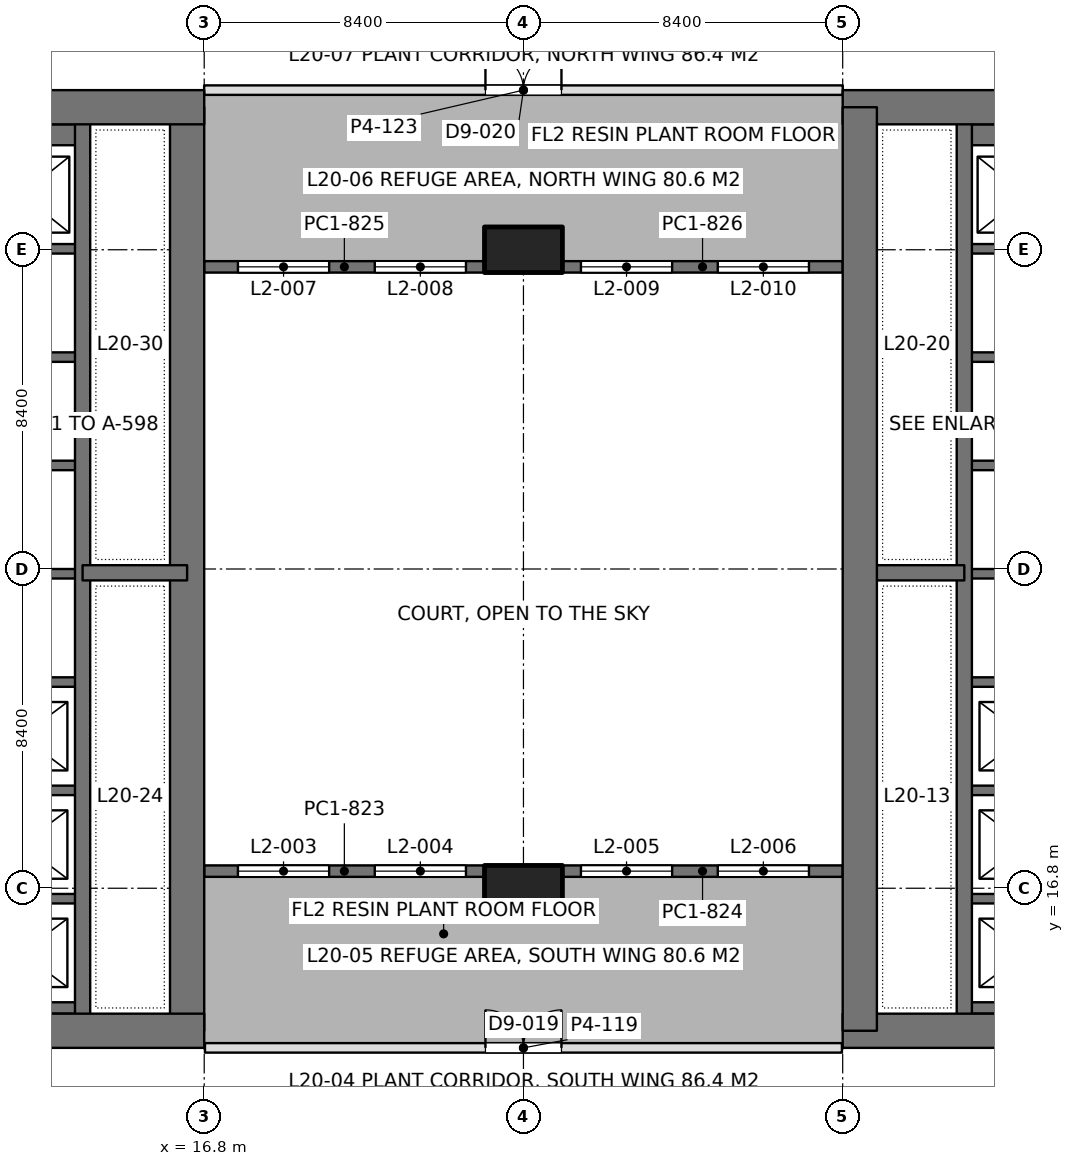
"""IFC4 building model, lengths in metres.
Left out: names, types, materials, properties, quantities, classifications, styles, units other than length and angle.
Written with IfcOpenShell. Run it as: python <this file> out.ifc"""

import sys

from ifc_helpers import new_model, si_unit, direction, frame, frame_2d, origin, origin_2d, place, context, subcontext, project, spatial, rectangle, extrude, element, fill, save


model = new_model("IFC4")
c1 = context("Model", 3, precision=1e-05, world=origin(), true_north=direction((0.0, 1.0)))
c2 = subcontext(c1, "Body", "Model", "MODEL_VIEW")
j1 = project(units=[si_unit("LENGTHUNIT", "METRE"), si_unit("PLANEANGLEUNIT", "RADIAN")], contexts=[c1])
p1 = place(None, origin())
s1 = spatial("IfcSite", under=j1, at=p1, CompositionType="ELEMENT")
p2 = place(p1, origin())
s2 = spatial("IfcBuilding", under=s1, at=p2, CompositionType="ELEMENT")
p3 = place(p2, frame((0.0, 0.0, 90.9)))
s3 = spatial("IfcBuildingStorey", under=s2, at=p3, CompositionType="ELEMENT", Elevation=90.9)
for number, where, z_axis, x_axis in (
    (1, (25.2, 16.8, 0.0), (0.0, 0.0, 1.0), (1.0, 0.0, 0.0)),
    (2, (25.2, 33.6, 0.0), (0.0, 0.0, 1.0), (1.0, 0.0, 0.0)),
):
    element("IfcColumn", number, at=place(p3, frame(where, z_axis=z_axis, x_axis=x_axis)), inside=s3, PredefinedType="COLUMN", context=c2, shape_type="SweptSolid", body=[
        extrude(rectangle(XDim=2.05, YDim=1.2, at=origin_2d()), origin(), (0.0, 0.0, 1.0), 5.4),
    ])
p4 = place(p3, frame((-1.2, 13.05, 0.0), z_axis=(0.0, 0.0, 1.0), x_axis=(1.0, 0.0, 0.0)))
e3 = element("IfcWall", 3, at=p4, inside=s3, PredefinedType="SHEAR", context=c2, shape_type="SweptSolid", body=[
    extrude(rectangle(XDim=18.0, YDim=0.9, at=frame_2d((9.0, 0.0))), origin(), (0.0, 0.0, 1.0), 5.4),
])
p5 = place(p4, frame((8.95, 0.0, 0.0)))
e4 = element("IfcOpeningElement", 4, at=p5, cuts=e3, PredefinedType="OPENING", context=c2, shape_type="SweptSolid", body=[
    extrude(rectangle(XDim=1.8, YDim=2.4, at=frame_2d((0.9, 1.2))), frame((0.0, 0.46, 0.0), z_axis=(0.0, -1.0, 0.0), x_axis=(1.0, 0.0, 0.0)), (0.0, 0.0, 1.0), 0.92),
])
p6 = place(p3, frame((-1.2, 37.35, 0.0), z_axis=(0.0, 0.0, 1.0), x_axis=(1.0, 0.0, 0.0)))
e5 = element("IfcWall", 5, at=p6, inside=s3, PredefinedType="SHEAR", context=c2, shape_type="SweptSolid", body=[
    extrude(rectangle(XDim=18.0, YDim=0.9, at=frame_2d((9.0, 0.0))), origin(), (0.0, 0.0, 1.0), 5.4),
])
p7 = place(p6, frame((8.95, 0.0, 0.0)))
e6 = element("IfcOpeningElement", 6, at=p7, cuts=e5, PredefinedType="OPENING", context=c2, shape_type="SweptSolid", body=[
    extrude(rectangle(XDim=1.8, YDim=2.4, at=frame_2d((0.9, 1.2))), frame((0.0, 0.46, 0.0), z_axis=(0.0, -1.0, 0.0), x_axis=(1.0, 0.0, 0.0)), (0.0, 0.0, 1.0), 0.92),
])
p8 = place(p3, frame((16.35, 13.05, 0.0), z_axis=(0.0, 0.0, 1.0), x_axis=(0.0, 1.0, 0.0)))
e7 = element("IfcWall", 7, at=p8, inside=s3, PredefinedType="SHEAR", context=c2, shape_type="SweptSolid", body=[
    extrude(rectangle(XDim=24.3, YDim=0.9, at=frame_2d((12.15, 0.0))), origin(), (0.0, 0.0, 1.0), 5.4),
])
p9 = place(p3, frame((13.6, 13.05, 0.0), z_axis=(0.0, 0.0, 1.0), x_axis=(0.0, 1.0, 0.0)))
e8 = element("IfcWall", 8, at=p9, inside=s3, PredefinedType="SHEAR", context=c2, shape_type="SweptSolid", body=[
    extrude(rectangle(XDim=24.3, YDim=0.4, at=frame_2d((12.15, 0.0))), origin(), (0.0, 0.0, 1.0), 5.4),
])
p10 = place(p3, frame((13.6, 25.1, 0.0), z_axis=(0.0, 0.0, 1.0), x_axis=(1.0, 0.0, 0.0)))
e9 = element("IfcWall", 9, at=p10, inside=s3, PredefinedType="SHEAR", context=c2, shape_type="SweptSolid", body=[
    extrude(rectangle(XDim=2.75, YDim=0.4, at=frame_2d((1.375, 0.0))), origin(), (0.0, 0.0, 1.0), 5.4),
])
p11 = place(p3, frame((10.4, 13.65, 0.0), z_axis=(0.0, 0.0, 1.0), x_axis=(1.0, 0.0, 0.0)))
e10 = element("IfcWall", 10, at=p11, inside=s3, PredefinedType="SHEAR", context=c2, shape_type="SweptSolid", body=[
    extrude(rectangle(XDim=3.2, YDim=0.3, at=frame_2d((1.6, 0.0))), origin(), (0.0, 0.0, 1.0), 5.4),
])
for number, where, z_axis, x_axis in (
    (11, (10.4, 16.525, 0.0), (0.0, 0.0, 1.0), (1.0, 0.0, 0.0)),
    (12, (10.4, 19.375, 0.0), (0.0, 0.0, 1.0), (1.0, 0.0, 0.0)),
    (13, (10.4, 22.225, 0.0), (0.0, 0.0, 1.0), (1.0, 0.0, 0.0)),
    (14, (10.4, 25.075, 0.0), (0.0, 0.0, 1.0), (1.0, 0.0, 0.0)),
    (15, (10.4, 27.925, 0.0), (0.0, 0.0, 1.0), (1.0, 0.0, 0.0)),
    (16, (10.4, 30.775, 0.0), (0.0, 0.0, 1.0), (1.0, 0.0, 0.0)),
    (17, (10.4, 33.625, 0.0), (0.0, 0.0, 1.0), (1.0, 0.0, 0.0)),
):
    element("IfcWall", number, at=place(p3, frame(where, z_axis=z_axis, x_axis=x_axis)), inside=s3, PredefinedType="SHEAR", context=c2, shape_type="SweptSolid", body=[
        extrude(rectangle(XDim=3.2, YDim=0.25, at=frame_2d((1.6, 0.0))), origin(), (0.0, 0.0, 1.0), 5.4),
    ])
p12 = place(p3, frame((10.4, 36.625, 0.0), z_axis=(0.0, 0.0, 1.0), x_axis=(1.0, 0.0, 0.0)))
e18 = element("IfcWall", 18, at=p12, inside=s3, PredefinedType="SHEAR", context=c2, shape_type="SweptSolid", body=[
    extrude(rectangle(XDim=3.2, YDim=0.55, at=frame_2d((1.6, 0.0))), origin(), (0.0, 0.0, 1.0), 5.4),
])
p13 = place(p3, frame((33.6, 13.05, 0.0), z_axis=(0.0, 0.0, 1.0), x_axis=(1.0, 0.0, 0.0)))
e19 = element("IfcWall", 19, at=p13, inside=s3, PredefinedType="SHEAR", context=c2, shape_type="SweptSolid", body=[
    extrude(rectangle(XDim=18.0, YDim=0.9, at=frame_2d((9.0, 0.0))), origin(), (0.0, 0.0, 1.0), 5.4),
])
p14 = place(p13, frame((7.25, 0.0, 0.0)))
e20 = element("IfcOpeningElement", 20, at=p14, cuts=e19, PredefinedType="OPENING", context=c2, shape_type="SweptSolid", body=[
    extrude(rectangle(XDim=1.8, YDim=2.4, at=frame_2d((0.9, 1.2))), frame((0.0, 0.46, 0.0), z_axis=(0.0, -1.0, 0.0), x_axis=(1.0, 0.0, 0.0)), (0.0, 0.0, 1.0), 0.92),
])
p15 = place(p3, frame((33.6, 37.35, 0.0), z_axis=(0.0, 0.0, 1.0), x_axis=(1.0, 0.0, 0.0)))
e21 = element("IfcWall", 21, at=p15, inside=s3, PredefinedType="SHEAR", context=c2, shape_type="SweptSolid", body=[
    extrude(rectangle(XDim=18.0, YDim=0.9, at=frame_2d((9.0, 0.0))), origin(), (0.0, 0.0, 1.0), 5.4),
])
p16 = place(p15, frame((7.25, 0.0, 0.0)))
e22 = element("IfcOpeningElement", 22, at=p16, cuts=e21, PredefinedType="OPENING", context=c2, shape_type="SweptSolid", body=[
    extrude(rectangle(XDim=1.8, YDim=2.4, at=frame_2d((0.9, 1.2))), frame((0.0, 0.46, 0.0), z_axis=(0.0, -1.0, 0.0), x_axis=(1.0, 0.0, 0.0)), (0.0, 0.0, 1.0), 0.92),
])
p17 = place(p3, frame((34.05, 13.05, 0.0), z_axis=(0.0, 0.0, 1.0), x_axis=(0.0, 1.0, 0.0)))
e23 = element("IfcWall", 23, at=p17, inside=s3, PredefinedType="SHEAR", context=c2, shape_type="SweptSolid", body=[
    extrude(rectangle(XDim=24.3, YDim=0.9, at=frame_2d((12.15, 0.0))), origin(), (0.0, 0.0, 1.0), 5.4),
])
p18 = place(p3, frame((36.8, 13.05, 0.0), z_axis=(0.0, 0.0, 1.0), x_axis=(0.0, 1.0, 0.0)))
e24 = element("IfcWall", 24, at=p18, inside=s3, PredefinedType="SHEAR", context=c2, shape_type="SweptSolid", body=[
    extrude(rectangle(XDim=24.3, YDim=0.4, at=frame_2d((12.15, 0.0))), origin(), (0.0, 0.0, 1.0), 5.4),
])
p19 = place(p3, frame((36.8, 25.1, 0.0), z_axis=(0.0, 0.0, 1.0), x_axis=(-1.0, 0.0, 0.0)))
e25 = element("IfcWall", 25, at=p19, inside=s3, PredefinedType="SHEAR", context=c2, shape_type="SweptSolid", body=[
    extrude(rectangle(XDim=2.75, YDim=0.4, at=frame_2d((1.375, 0.0))), origin(), (0.0, 0.0, 1.0), 5.4),
])
p20 = place(p3, frame((40.0, 13.65, 0.0), z_axis=(0.0, 0.0, 1.0), x_axis=(-1.0, 0.0, 0.0)))
e26 = element("IfcWall", 26, at=p20, inside=s3, PredefinedType="SHEAR", context=c2, shape_type="SweptSolid", body=[
    extrude(rectangle(XDim=3.2, YDim=0.3, at=frame_2d((1.6, 0.0))), origin(), (0.0, 0.0, 1.0), 5.4),
])
for number, where, z_axis, x_axis in (
    (27, (40.0, 16.525, 0.0), (0.0, 0.0, 1.0), (-1.0, 0.0, 0.0)),
    (28, (40.0, 19.375, 0.0), (0.0, 0.0, 1.0), (-1.0, 0.0, 0.0)),
    (29, (40.0, 22.225, 0.0), (0.0, 0.0, 1.0), (-1.0, 0.0, 0.0)),
    (30, (40.0, 25.075, 0.0), (0.0, 0.0, 1.0), (-1.0, 0.0, 0.0)),
    (31, (40.0, 27.925, 0.0), (0.0, 0.0, 1.0), (-1.0, 0.0, 0.0)),
    (32, (40.0, 30.775, 0.0), (0.0, 0.0, 1.0), (-1.0, 0.0, 0.0)),
    (33, (40.0, 33.625, 0.0), (0.0, 0.0, 1.0), (-1.0, 0.0, 0.0)),
):
    element("IfcWall", number, at=place(p3, frame(where, z_axis=z_axis, x_axis=x_axis)), inside=s3, PredefinedType="SHEAR", context=c2, shape_type="SweptSolid", body=[
        extrude(rectangle(XDim=3.2, YDim=0.25, at=frame_2d((1.6, 0.0))), origin(), (0.0, 0.0, 1.0), 5.4),
    ])
p21 = place(p3, frame((40.0, 36.625, 0.0), z_axis=(0.0, 0.0, 1.0), x_axis=(-1.0, 0.0, 0.0)))
e34 = element("IfcWall", 34, at=p21, inside=s3, PredefinedType="SHEAR", context=c2, shape_type="SweptSolid", body=[
    extrude(rectangle(XDim=3.2, YDim=0.55, at=frame_2d((1.6, 0.0))), origin(), (0.0, 0.0, 1.0), 5.4),
])
p22 = place(p3, frame((16.8, 17.25, 0.0), z_axis=(0.0, 0.0, 1.0), x_axis=(1.0, 0.0, 0.0)))
e35 = element("IfcWall", 35, at=p22, inside=s3, PredefinedType="SOLIDWALL", context=c2, shape_type="SweptSolid", body=[
    extrude(rectangle(XDim=7.375, YDim=0.3, at=frame_2d((3.688, 0.0))), origin(), (0.0, 0.0, 1.0), 5.24),
])
p23 = place(p22, frame((0.887, 0.0, 1.2)))
e36 = element("IfcOpeningElement", 36, at=p23, cuts=e35, PredefinedType="OPENING", context=c2, shape_type="SweptSolid", body=[
    extrude(rectangle(XDim=2.4, YDim=2.4, at=frame_2d((1.2, 1.2))), frame((0.0, 0.16, 0.0), z_axis=(0.0, -1.0, 0.0), x_axis=(1.0, 0.0, 0.0)), (0.0, 0.0, 1.0), 0.32),
])
p24 = place(p22, frame((4.488, 0.0, 1.2)))
e37 = element("IfcOpeningElement", 37, at=p24, cuts=e35, PredefinedType="OPENING", context=c2, shape_type="SweptSolid", body=[
    extrude(rectangle(XDim=2.4, YDim=2.4, at=frame_2d((1.2, 1.2))), frame((0.0, 0.16, 0.0), z_axis=(0.0, -1.0, 0.0), x_axis=(1.0, 0.0, 0.0)), (0.0, 0.0, 1.0), 0.32),
])
p25 = place(p3, frame((26.225, 17.25, 0.0), z_axis=(0.0, 0.0, 1.0), x_axis=(1.0, 0.0, 0.0)))
e38 = element("IfcWall", 38, at=p25, inside=s3, PredefinedType="SOLIDWALL", context=c2, shape_type="SweptSolid", body=[
    extrude(rectangle(XDim=7.375, YDim=0.3, at=frame_2d((3.688, 0.0))), origin(), (0.0, 0.0, 1.0), 5.24),
])
p26 = place(p25, frame((0.488, 0.0, 1.2)))
e39 = element("IfcOpeningElement", 39, at=p26, cuts=e38, PredefinedType="OPENING", context=c2, shape_type="SweptSolid", body=[
    extrude(rectangle(XDim=2.4, YDim=2.4, at=frame_2d((1.2, 1.2))), frame((0.0, 0.16, 0.0), z_axis=(0.0, -1.0, 0.0), x_axis=(1.0, 0.0, 0.0)), (0.0, 0.0, 1.0), 0.32),
])
p27 = place(p25, frame((4.087, 0.0, 1.2)))
e40 = element("IfcOpeningElement", 40, at=p27, cuts=e38, PredefinedType="OPENING", context=c2, shape_type="SweptSolid", body=[
    extrude(rectangle(XDim=2.4, YDim=2.4, at=frame_2d((1.2, 1.2))), frame((0.0, 0.16, 0.0), z_axis=(0.0, -1.0, 0.0), x_axis=(1.0, 0.0, 0.0)), (0.0, 0.0, 1.0), 0.32),
])
p28 = place(p3, frame((16.8, 33.15, 0.0), z_axis=(0.0, 0.0, 1.0), x_axis=(1.0, 0.0, 0.0)))
e41 = element("IfcWall", 41, at=p28, inside=s3, PredefinedType="SOLIDWALL", context=c2, shape_type="SweptSolid", body=[
    extrude(rectangle(XDim=7.375, YDim=0.3, at=frame_2d((3.688, 0.0))), origin(), (0.0, 0.0, 1.0), 5.24),
])
p29 = place(p28, frame((0.887, 0.0, 1.2)))
e42 = element("IfcOpeningElement", 42, at=p29, cuts=e41, PredefinedType="OPENING", context=c2, shape_type="SweptSolid", body=[
    extrude(rectangle(XDim=2.4, YDim=2.4, at=frame_2d((1.2, 1.2))), frame((0.0, 0.16, 0.0), z_axis=(0.0, -1.0, 0.0), x_axis=(1.0, 0.0, 0.0)), (0.0, 0.0, 1.0), 0.32),
])
p30 = place(p28, frame((4.488, 0.0, 1.2)))
e43 = element("IfcOpeningElement", 43, at=p30, cuts=e41, PredefinedType="OPENING", context=c2, shape_type="SweptSolid", body=[
    extrude(rectangle(XDim=2.4, YDim=2.4, at=frame_2d((1.2, 1.2))), frame((0.0, 0.16, 0.0), z_axis=(0.0, -1.0, 0.0), x_axis=(1.0, 0.0, 0.0)), (0.0, 0.0, 1.0), 0.32),
])
p31 = place(p3, frame((26.225, 33.15, 0.0), z_axis=(0.0, 0.0, 1.0), x_axis=(1.0, 0.0, 0.0)))
e44 = element("IfcWall", 44, at=p31, inside=s3, PredefinedType="SOLIDWALL", context=c2, shape_type="SweptSolid", body=[
    extrude(rectangle(XDim=7.375, YDim=0.3, at=frame_2d((3.688, 0.0))), origin(), (0.0, 0.0, 1.0), 5.24),
])
p32 = place(p31, frame((0.488, 0.0, 1.2)))
e45 = element("IfcOpeningElement", 45, at=p32, cuts=e44, PredefinedType="OPENING", context=c2, shape_type="SweptSolid", body=[
    extrude(rectangle(XDim=2.4, YDim=2.4, at=frame_2d((1.2, 1.2))), frame((0.0, 0.16, 0.0), z_axis=(0.0, -1.0, 0.0), x_axis=(1.0, 0.0, 0.0)), (0.0, 0.0, 1.0), 0.32),
])
p33 = place(p31, frame((4.087, 0.0, 1.2)))
e46 = element("IfcOpeningElement", 46, at=p33, cuts=e44, PredefinedType="OPENING", context=c2, shape_type="SweptSolid", body=[
    extrude(rectangle(XDim=2.4, YDim=2.4, at=frame_2d((1.2, 1.2))), frame((0.0, 0.16, 0.0), z_axis=(0.0, -1.0, 0.0), x_axis=(1.0, 0.0, 0.0)), (0.0, 0.0, 1.0), 0.32),
])
p34 = place(p3, frame((16.82, 12.6, 0.0), z_axis=(0.0, 0.0, 1.0), x_axis=(1.0, 0.0, 0.0)))
e47 = element("IfcWall", 47, at=p34, inside=s3, PredefinedType="PARTITIONING", context=c2, shape_type="SweptSolid", body=[
    extrude(rectangle(XDim=16.76, YDim=0.25, at=frame_2d((8.38, 0.0))), origin(), (0.0, 0.0, 1.0), 4.64),
])
p35 = place(p34, frame((7.38, 0.0, 0.0)))
e48 = element("IfcOpeningElement", 48, at=p35, cuts=e47, PredefinedType="OPENING", context=c2, shape_type="SweptSolid", body=[
    extrude(rectangle(XDim=2.0, YDim=2.4, at=frame_2d((1.0, 1.2))), frame((0.0, 0.135, 0.0), z_axis=(0.0, -1.0, 0.0), x_axis=(1.0, 0.0, 0.0)), (0.0, 0.0, 1.0), 0.27),
])
p36 = place(p3, frame((16.798, 37.8, 0.0), z_axis=(0.0, 0.0, 1.0), x_axis=(1.0, 0.0, 0.0)))
e49 = element("IfcWall", 49, at=p36, inside=s3, PredefinedType="PARTITIONING", context=c2, shape_type="SweptSolid", body=[
    extrude(rectangle(XDim=16.804, YDim=0.25, at=frame_2d((8.402, 0.0))), origin(), (0.0, 0.0, 1.0), 4.64),
])
p37 = place(p36, frame((7.402, 0.0, 0.0)))
e50 = element("IfcOpeningElement", 50, at=p37, cuts=e49, PredefinedType="OPENING", context=c2, shape_type="SweptSolid", body=[
    extrude(rectangle(XDim=2.0, YDim=2.4, at=frame_2d((1.0, 1.2))), frame((0.0, 0.135, 0.0), z_axis=(0.0, -1.0, 0.0), x_axis=(1.0, 0.0, 0.0)), (0.0, 0.0, 1.0), 0.27),
])
p38 = place(p23, origin())
e51 = element("IfcWindow", 51, at=p38, inside=s3, PartitioningType="SINGLE_PANEL", PredefinedType="USERDEFINED", context=c2, shape_type="SweptSolid", body=[
    extrude(rectangle(XDim=2.4, YDim=2.4, at=frame_2d((1.2, 1.2))), frame((0.0, 0.03, 0.0), z_axis=(0.0, -1.0, 0.0), x_axis=(1.0, 0.0, 0.0)), (0.0, 0.0, 1.0), 0.06),
])
fill(e36, e51)
p39 = place(p24, origin())
e52 = element("IfcWindow", 52, at=p39, inside=s3, PartitioningType="SINGLE_PANEL", PredefinedType="USERDEFINED", context=c2, shape_type="SweptSolid", body=[
    extrude(rectangle(XDim=2.4, YDim=2.4, at=frame_2d((1.2, 1.2))), frame((0.0, 0.03, 0.0), z_axis=(0.0, -1.0, 0.0), x_axis=(1.0, 0.0, 0.0)), (0.0, 0.0, 1.0), 0.06),
])
fill(e37, e52)
p40 = place(p26, origin())
e53 = element("IfcWindow", 53, at=p40, inside=s3, PartitioningType="SINGLE_PANEL", PredefinedType="USERDEFINED", context=c2, shape_type="SweptSolid", body=[
    extrude(rectangle(XDim=2.4, YDim=2.4, at=frame_2d((1.2, 1.2))), frame((0.0, 0.03, 0.0), z_axis=(0.0, -1.0, 0.0), x_axis=(1.0, 0.0, 0.0)), (0.0, 0.0, 1.0), 0.06),
])
fill(e39, e53)
p41 = place(p27, origin())
e54 = element("IfcWindow", 54, at=p41, inside=s3, PartitioningType="SINGLE_PANEL", PredefinedType="USERDEFINED", context=c2, shape_type="SweptSolid", body=[
    extrude(rectangle(XDim=2.4, YDim=2.4, at=frame_2d((1.2, 1.2))), frame((0.0, 0.03, 0.0), z_axis=(0.0, -1.0, 0.0), x_axis=(1.0, 0.0, 0.0)), (0.0, 0.0, 1.0), 0.06),
])
fill(e40, e54)
p42 = place(p29, origin())
e55 = element("IfcWindow", 55, at=p42, inside=s3, PartitioningType="SINGLE_PANEL", PredefinedType="USERDEFINED", context=c2, shape_type="SweptSolid", body=[
    extrude(rectangle(XDim=2.4, YDim=2.4, at=frame_2d((1.2, 1.2))), frame((0.0, 0.03, 0.0), z_axis=(0.0, -1.0, 0.0), x_axis=(1.0, 0.0, 0.0)), (0.0, 0.0, 1.0), 0.06),
])
fill(e42, e55)
p43 = place(p30, origin())
e56 = element("IfcWindow", 56, at=p43, inside=s3, PartitioningType="SINGLE_PANEL", PredefinedType="USERDEFINED", context=c2, shape_type="SweptSolid", body=[
    extrude(rectangle(XDim=2.4, YDim=2.4, at=frame_2d((1.2, 1.2))), frame((0.0, 0.03, 0.0), z_axis=(0.0, -1.0, 0.0), x_axis=(1.0, 0.0, 0.0)), (0.0, 0.0, 1.0), 0.06),
])
fill(e43, e56)
p44 = place(p32, origin())
e57 = element("IfcWindow", 57, at=p44, inside=s3, PartitioningType="SINGLE_PANEL", PredefinedType="USERDEFINED", context=c2, shape_type="SweptSolid", body=[
    extrude(rectangle(XDim=2.4, YDim=2.4, at=frame_2d((1.2, 1.2))), frame((0.0, 0.03, 0.0), z_axis=(0.0, -1.0, 0.0), x_axis=(1.0, 0.0, 0.0)), (0.0, 0.0, 1.0), 0.06),
])
fill(e45, e57)
p45 = place(p33, origin())
e58 = element("IfcWindow", 58, at=p45, inside=s3, PartitioningType="SINGLE_PANEL", PredefinedType="USERDEFINED", context=c2, shape_type="SweptSolid", body=[
    extrude(rectangle(XDim=2.4, YDim=2.4, at=frame_2d((1.2, 1.2))), frame((0.0, 0.03, 0.0), z_axis=(0.0, -1.0, 0.0), x_axis=(1.0, 0.0, 0.0)), (0.0, 0.0, 1.0), 0.06),
])
fill(e46, e58)
p46 = place(p35, origin())
e59 = element("IfcDoor", 59, at=p46, inside=s3, OperationType="DOUBLE_DOOR_SINGLE_SWING", PredefinedType="DOOR", context=c2, shape_type="SweptSolid", body=[
    extrude(rectangle(XDim=2.0, YDim=2.4, at=frame_2d((1.0, 1.2))), frame((0.0, 0.025, 0.0), z_axis=(0.0, -1.0, 0.0), x_axis=(1.0, 0.0, 0.0)), (0.0, 0.0, 1.0), 0.05),
])
fill(e48, e59)
p47 = place(p37, origin())
e60 = element("IfcDoor", 60, at=p47, inside=s3, OperationType="DOUBLE_DOOR_SINGLE_SWING", PredefinedType="DOOR", context=c2, shape_type="SweptSolid", body=[
    extrude(rectangle(XDim=2.0, YDim=2.4, at=frame_2d((1.0, 1.2))), frame((0.0, 0.025, 0.0), z_axis=(0.0, -1.0, 0.0), x_axis=(1.0, 0.0, 0.0)), (0.0, 0.0, 1.0), 0.05),
])
fill(e50, e60)
save(model, sys.argv[1])
